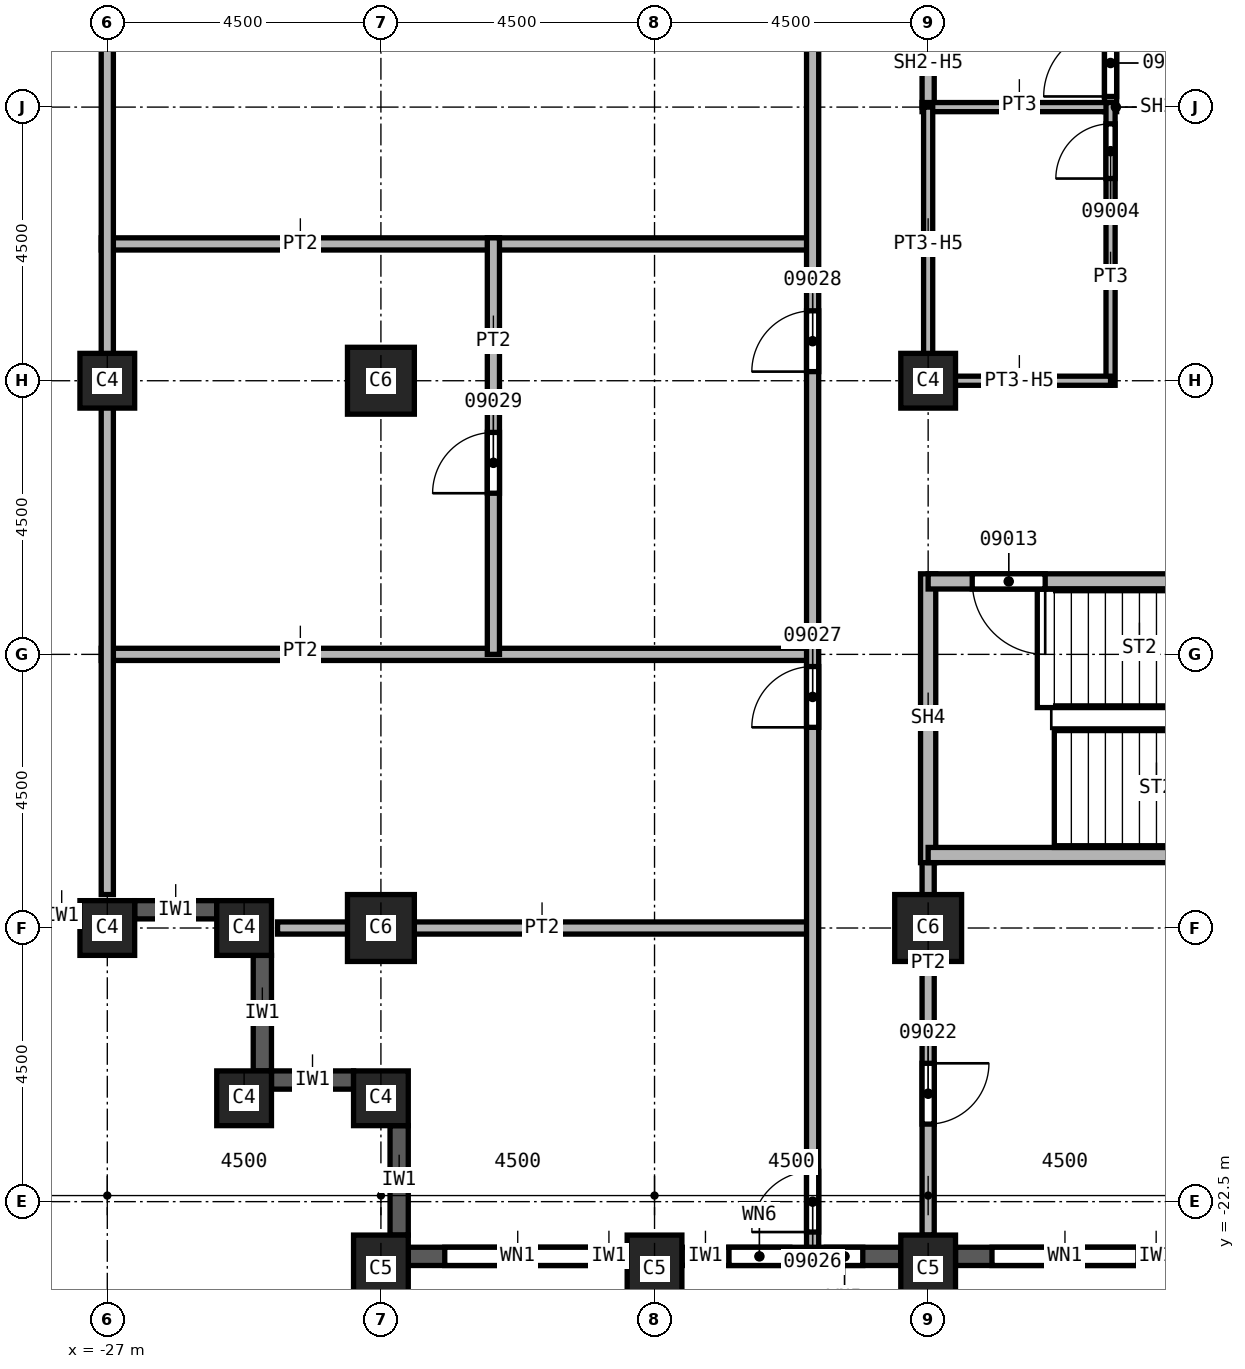
"""IFC4 building model, lengths in metres.
Left out: names, types, materials, properties, quantities, classifications, styles, units other than length and angle.
Written with IfcOpenShell. Run it as: python <this file> out.ifc"""

import sys

from ifc_helpers import new_model, si_unit, direction, frame, frame_2d, origin, origin_2d, place, context, subcontext, project, spatial, rectangle, extrude, element, fill, save


model = new_model("IFC4")
c1 = context("Model", 3, precision=1e-05, world=origin(), true_north=direction((0.0, 1.0)))
c2 = subcontext(c1, "Body", "Model", "MODEL_VIEW")
j1 = project(units=[si_unit("LENGTHUNIT", "METRE"), si_unit("PLANEANGLEUNIT", "RADIAN")], contexts=[c1])
p1 = place(None, origin())
s1 = spatial("IfcSite", under=j1, at=p1, CompositionType="ELEMENT")
p2 = place(p1, origin())
s2 = spatial("IfcBuilding", under=s1, at=p2, CompositionType="ELEMENT")
p3 = place(p2, frame((0.0, 0.0, 166.0)))
s3 = spatial("IfcBuildingStorey", under=s2, at=p3, CompositionType="ELEMENT", Elevation=166.0)
for number, where, z_axis, x_axis in (
    (1, (-13.5, -18.0, 0.0), (0.0, 0.0, 1.0), (1.0, 0.0, 0.0)),
    (2, (-22.5, -9.0, 0.0), (0.0, 0.0, 1.0), (1.0, 0.0, 0.0)),
    (3, (-22.5, -18.0, 0.0), (0.0, 0.0, 1.0), (1.0, 0.0, 0.0)),
):
    element("IfcColumn", number, at=place(p3, frame(where, z_axis=z_axis, x_axis=x_axis)), inside=s3, PredefinedType="COLUMN", context=c2, shape_type="SweptSolid", body=[
        extrude(rectangle(XDim=1.1, YDim=1.1, at=origin_2d()), origin(), (0.0, 0.0, 1.0), 3.7),
    ])
p4 = place(p3, frame((-13.5, -9.0, 0.0), z_axis=(0.0, 0.0, 1.0), x_axis=(1.0, 0.0, 0.0)))
e4 = element("IfcColumn", 4, at=p4, inside=s3, PredefinedType="COLUMN", context=c2, shape_type="SweptSolid", body=[
    extrude(rectangle(XDim=0.9, YDim=0.9, at=origin_2d()), origin(), (0.0, 0.0, 1.0), 3.7),
])
for number, where, z_axis, x_axis in (
    (5, (-13.5, -23.6, 0.0), (0.0, 0.0, 1.0), (1.0, 0.0, 0.0)),
    (6, (-18.0, -23.6, 0.0), (0.0, 0.0, 1.0), (1.0, 0.0, 0.0)),
    (7, (-22.5, -23.6, 0.0), (0.0, 0.0, 1.0), (1.0, 0.0, 0.0)),
):
    element("IfcColumn", number, at=place(p3, frame(where, z_axis=z_axis, x_axis=x_axis)), inside=s3, PredefinedType="COLUMN", context=c2, shape_type="SweptSolid", body=[
        extrude(rectangle(XDim=0.9, YDim=1.1, at=origin_2d()), origin(), (0.0, 0.0, 1.0), 3.7),
    ])
for number, where, z_axis, x_axis in (
    (8, (-27.0, -9.0, 0.0), (0.0, 0.0, 1.0), (1.0, 0.0, 0.0)),
    (9, (-27.0, -18.0, 0.0), (0.0, 0.0, 1.0), (1.0, 0.0, 0.0)),
    (10, (-22.5, -20.8, 0.0), (0.0, 0.0, 1.0), (1.0, 0.0, 0.0)),
    (11, (-24.75, -20.8, 0.0), (0.0, 0.0, 1.0), (1.0, 0.0, 0.0)),
    (12, (-24.75, -18.0, 0.0), (0.0, 0.0, 1.0), (1.0, 0.0, 0.0)),
):
    element("IfcColumn", number, at=place(p3, frame(where, z_axis=z_axis, x_axis=x_axis)), inside=s3, PredefinedType="COLUMN", context=c2, shape_type="SweptSolid", body=[
        extrude(rectangle(XDim=0.9, YDim=0.9, at=origin_2d()), origin(), (0.0, 0.0, 1.0), 3.7),
    ])
p5 = place(p3, frame((-31.05, -17.8, 0.0), z_axis=(0.0, 0.0, 1.0), x_axis=(1.0, 0.0, 0.0)))
e13 = element("IfcWall", 13, at=p5, inside=s3, PredefinedType="SOLIDWALL", context=c2, shape_type="SweptSolid", body=[
    extrude(rectangle(XDim=3.6, YDim=0.3, at=frame_2d((1.8, 0.0))), origin(), (0.0, 0.0, 1.0), 3.1),
])
p6 = place(p5, frame((0.6, 0.0, 0.8)))
e14 = element("IfcOpeningElement", 14, at=p6, cuts=e13, PredefinedType="OPENING", context=c2, shape_type="SweptSolid", body=[
    extrude(rectangle(XDim=2.4, YDim=1.95, at=frame_2d((1.2, 0.975))), frame((0.0, 0.15, 0.0), z_axis=(0.0, -1.0, 0.0), x_axis=(1.0, 0.0, 0.0)), (0.0, 0.0, 1.0), 0.3),
])
p7 = place(p3, frame((-26.55, -17.7, 0.0), z_axis=(0.0, 0.0, 1.0), x_axis=(1.0, 0.0, 0.0)))
e15 = element("IfcWall", 15, at=p7, inside=s3, PredefinedType="SOLIDWALL", context=c2, shape_type="SweptSolid", body=[
    extrude(rectangle(XDim=1.35, YDim=0.3, at=frame_2d((0.675, 0.0))), origin(), (0.0, 0.0, 1.0), 3.1),
])
p8 = place(p3, frame((-24.45, -18.45, 0.0), z_axis=(0.0, 0.0, 1.0), x_axis=(0.0, -1.0, 0.0)))
e16 = element("IfcWall", 16, at=p8, inside=s3, PredefinedType="SOLIDWALL", context=c2, shape_type="SweptSolid", body=[
    extrude(rectangle(XDim=1.9, YDim=0.3, at=frame_2d((0.95, 0.0))), origin(), (0.0, 0.0, 1.0), 3.1),
])
p9 = place(p3, frame((-24.3, -20.5, 0.0), z_axis=(0.0, 0.0, 1.0), x_axis=(1.0, 0.0, 0.0)))
e17 = element("IfcWall", 17, at=p9, inside=s3, PredefinedType="SOLIDWALL", context=c2, shape_type="SweptSolid", body=[
    extrude(rectangle(XDim=1.35, YDim=0.3, at=frame_2d((0.675, 0.0))), origin(), (0.0, 0.0, 1.0), 3.1),
])
p10 = place(p3, frame((-22.2, -21.25, 0.0), z_axis=(0.0, 0.0, 1.0), x_axis=(0.0, -1.0, 0.0)))
e18 = element("IfcWall", 18, at=p10, inside=s3, PredefinedType="SOLIDWALL", context=c2, shape_type="SweptSolid", body=[
    extrude(rectangle(XDim=1.8, YDim=0.3, at=frame_2d((0.9, 0.0))), origin(), (0.0, 0.0, 1.0), 3.1),
])
p11 = place(p3, frame((-22.05, -23.4, 0.0), z_axis=(0.0, 0.0, 1.0), x_axis=(1.0, 0.0, 0.0)))
e19 = element("IfcWall", 19, at=p11, inside=s3, PredefinedType="SOLIDWALL", context=c2, shape_type="SweptSolid", body=[
    extrude(rectangle(XDim=3.6, YDim=0.3, at=frame_2d((1.8, 0.0))), origin(), (0.0, 0.0, 1.0), 3.1),
])
p12 = place(p11, frame((0.6, 0.0, 0.8)))
e20 = element("IfcOpeningElement", 20, at=p12, cuts=e19, PredefinedType="OPENING", context=c2, shape_type="SweptSolid", body=[
    extrude(rectangle(XDim=2.4, YDim=1.95, at=frame_2d((1.2, 0.975))), frame((0.0, 0.15, 0.0), z_axis=(0.0, -1.0, 0.0), x_axis=(1.0, 0.0, 0.0)), (0.0, 0.0, 1.0), 0.3),
])
p13 = place(p3, frame((-17.55, -23.4, 0.0), z_axis=(0.0, 0.0, 1.0), x_axis=(1.0, 0.0, 0.0)))
e21 = element("IfcWall", 21, at=p13, inside=s3, PredefinedType="SOLIDWALL", context=c2, shape_type="SweptSolid", body=[
    extrude(rectangle(XDim=3.6, YDim=0.3, at=frame_2d((1.8, 0.0))), origin(), (0.0, 0.0, 1.0), 3.1),
])
p14 = place(p13, frame((0.775, 0.0, 0.8)))
e22 = element("IfcOpeningElement", 22, at=p14, cuts=e21, PredefinedType="OPENING", context=c2, shape_type="SweptSolid", body=[
    extrude(rectangle(XDim=1.0, YDim=1.95, at=frame_2d((0.5, 0.975))), frame((0.0, 0.15, 0.0), z_axis=(0.0, -1.0, 0.0), x_axis=(1.0, 0.0, 0.0)), (0.0, 0.0, 1.0), 0.3),
])
p15 = place(p13, frame((2.375, 0.0, 0.8)))
e23 = element("IfcOpeningElement", 23, at=p15, cuts=e21, PredefinedType="OPENING", context=c2, shape_type="SweptSolid", body=[
    extrude(rectangle(XDim=0.6, YDim=1.95, at=frame_2d((0.3, 0.975))), frame((0.0, 0.15, 0.0), z_axis=(0.0, -1.0, 0.0), x_axis=(1.0, 0.0, 0.0)), (0.0, 0.0, 1.0), 0.3),
])
p16 = place(p3, frame((-13.05, -23.4, 0.0), z_axis=(0.0, 0.0, 1.0), x_axis=(1.0, 0.0, 0.0)))
e24 = element("IfcWall", 24, at=p16, inside=s3, PredefinedType="SOLIDWALL", context=c2, shape_type="SweptSolid", body=[
    extrude(rectangle(XDim=3.6, YDim=0.3, at=frame_2d((1.8, 0.0))), origin(), (0.0, 0.0, 1.0), 3.1),
])
p17 = place(p16, frame((0.6, 0.0, 0.8)))
e25 = element("IfcOpeningElement", 25, at=p17, cuts=e24, PredefinedType="OPENING", context=c2, shape_type="SweptSolid", body=[
    extrude(rectangle(XDim=2.4, YDim=1.95, at=frame_2d((1.2, 0.975))), frame((0.0, 0.15, 0.0), z_axis=(0.0, -1.0, 0.0), x_axis=(1.0, 0.0, 0.0)), (0.0, 0.0, 1.0), 0.3),
])
for number, where, z_axis, x_axis in (
    (26, (-27.1, -13.5, 0.0), (0.0, 0.0, 1.0), (1.0, 0.0, 0.0)),
    (27, (-27.1, -6.75, 0.0), (0.0, 0.0, 1.0), (1.0, 0.0, 0.0)),
):
    element("IfcWall", number, at=place(p3, frame(where, z_axis=z_axis, x_axis=x_axis)), inside=s3, PredefinedType="PARTITIONING", context=c2, shape_type="SweptSolid", body=[
        extrude(rectangle(XDim=11.7, YDim=0.2, at=frame_2d((5.85, 0.0))), origin(), (0.0, 0.0, 1.0), 3.7),
    ])
p18 = place(p3, frame((-27.0, -17.45, 0.0), z_axis=(0.0, 0.0, 1.0), x_axis=(0.0, 1.0, 0.0)))
e28 = element("IfcWall", 28, at=p18, inside=s3, PredefinedType="PARTITIONING", context=c2, shape_type="SweptSolid", body=[
    extrude(rectangle(XDim=18.2, YDim=0.2, at=frame_2d((9.1, 0.0))), origin(), (0.0, 0.0, 1.0), 3.7),
])
p19 = place(p3, frame((-24.2, -18.0, 0.0), z_axis=(0.0, 0.0, 1.0), x_axis=(1.0, 0.0, 0.0)))
e29 = element("IfcWall", 29, at=p19, inside=s3, PredefinedType="PARTITIONING", context=c2, shape_type="SweptSolid", body=[
    extrude(rectangle(XDim=8.8, YDim=0.2, at=frame_2d((4.4, 0.0))), origin(), (0.0, 0.0, 1.0), 3.7),
])
p20 = place(p3, frame((-20.65, -13.5, 0.0), z_axis=(0.0, 0.0, 1.0), x_axis=(0.0, 1.0, 0.0)))
e30 = element("IfcWall", 30, at=p20, inside=s3, PredefinedType="PARTITIONING", context=c2, shape_type="SweptSolid", body=[
    extrude(rectangle(XDim=6.85, YDim=0.2, at=frame_2d((3.425, 0.0))), origin(), (0.0, 0.0, 1.0), 3.7),
])
p21 = place(p20, frame((2.65, 0.0, 0.0)))
e31 = element("IfcOpeningElement", 31, at=p21, cuts=e30, PredefinedType="OPENING", context=c2, shape_type="SweptSolid", body=[
    extrude(rectangle(XDim=1.0, YDim=2.1, at=frame_2d((0.5, 1.05))), frame((0.0, 0.1, 0.0), z_axis=(0.0, -1.0, 0.0), x_axis=(1.0, 0.0, 0.0)), (0.0, 0.0, 1.0), 0.2),
])
p22 = place(p3, frame((-15.4, -23.25, 0.0), z_axis=(0.0, 0.0, 1.0), x_axis=(0.0, 1.0, 0.0)))
e32 = element("IfcWall", 32, at=p22, inside=s3, PredefinedType="PARTITIONING", context=c2, shape_type="SweptSolid", body=[
    extrude(rectangle(XDim=24.1, YDim=0.2, at=frame_2d((12.05, 0.0))), origin(), (0.0, 0.0, 1.0), 3.7),
])
p23 = place(p22, frame((0.25, 0.0, 0.0)))
e33 = element("IfcOpeningElement", 33, at=p23, cuts=e32, PredefinedType="OPENING", context=c2, shape_type="SweptSolid", body=[
    extrude(rectangle(XDim=1.0, YDim=2.1, at=frame_2d((0.5, 1.05))), frame((0.0, 0.1, 0.0), z_axis=(0.0, -1.0, 0.0), x_axis=(1.0, 0.0, 0.0)), (0.0, 0.0, 1.0), 0.2),
])
p24 = place(p22, frame((8.55, 0.0, 0.0)))
e34 = element("IfcOpeningElement", 34, at=p24, cuts=e32, PredefinedType="OPENING", context=c2, shape_type="SweptSolid", body=[
    extrude(rectangle(XDim=1.0, YDim=2.1, at=frame_2d((0.5, 1.05))), frame((0.0, 0.1, 0.0), z_axis=(0.0, -1.0, 0.0), x_axis=(1.0, 0.0, 0.0)), (0.0, 0.0, 1.0), 0.2),
])
p25 = place(p22, frame((14.4, 0.0, 0.0)))
e35 = element("IfcOpeningElement", 35, at=p25, cuts=e32, PredefinedType="OPENING", context=c2, shape_type="SweptSolid", body=[
    extrude(rectangle(XDim=1.0, YDim=2.1, at=frame_2d((0.5, 1.05))), frame((0.0, 0.1, 0.0), z_axis=(0.0, -1.0, 0.0), x_axis=(1.0, 0.0, 0.0)), (0.0, 0.0, 1.0), 0.2),
])
p26 = place(p3, frame((-13.5, -16.675, 0.0), z_axis=(0.0, 0.0, 1.0), x_axis=(0.0, -1.0, 0.0)))
e36 = element("IfcWall", 36, at=p26, inside=s3, PredefinedType="PARTITIONING", context=c2, shape_type="SweptSolid", body=[
    extrude(rectangle(XDim=6.375, YDim=0.2, at=frame_2d((3.188, 0.0))), origin(), (0.0, 0.0, 1.0), 3.7),
])
p27 = place(p26, frame((3.55, 0.0, 0.0)))
e37 = element("IfcOpeningElement", 37, at=p27, cuts=e36, PredefinedType="OPENING", context=c2, shape_type="SweptSolid", body=[
    extrude(rectangle(XDim=1.0, YDim=2.1, at=frame_2d((0.5, 1.05))), frame((0.0, 0.1, 0.0), z_axis=(0.0, -1.0, 0.0), x_axis=(1.0, 0.0, 0.0)), (0.0, 0.0, 1.0), 0.2),
])
p28 = place(p3, frame((-13.5, -4.5, 0.0), z_axis=(0.0, 0.0, 1.0), x_axis=(0.0, 1.0, 0.0)))
e38 = element("IfcWall", 38, at=p28, inside=s3, PredefinedType="SOLIDWALL", context=c2, shape_type="SweptSolid", body=[
    extrude(rectangle(XDim=1.5, YDim=0.2, at=frame_2d((0.75, 0.0))), origin(), (0.0, 0.0, 1.0), 2.938),
])
p29 = place(p3, frame((-10.5, -4.575, 0.0), z_axis=(0.0, 0.0, 1.0), x_axis=(0.0, 1.0, 0.0)))
e39 = element("IfcWall", 39, at=p29, inside=s3, PredefinedType="SOLIDWALL", context=c2, shape_type="SweptSolid", body=[
    extrude(rectangle(XDim=1.7, YDim=0.2, at=frame_2d((0.85, 0.0))), origin(), (0.0, 0.0, 1.0), 3.7),
])
p30 = place(p29, frame((0.25, 0.0, 0.0)))
e40 = element("IfcOpeningElement", 40, at=p30, cuts=e39, PredefinedType="OPENING", context=c2, shape_type="SweptSolid", body=[
    extrude(rectangle(XDim=1.1, YDim=2.1, at=frame_2d((0.55, 1.05))), frame((0.0, 0.1, 0.0), z_axis=(0.0, -1.0, 0.0), x_axis=(1.0, 0.0, 0.0)), (0.0, 0.0, 1.0), 0.2),
])
p31 = place(p3, frame((-13.5, -12.175, 0.0), z_axis=(0.0, 0.0, 1.0), x_axis=(0.0, -1.0, 0.0)))
e41 = element("IfcWall", 41, at=p31, inside=s3, PredefinedType="SOLIDWALL", context=c2, shape_type="SweptSolid", body=[
    extrude(rectangle(XDim=4.75, YDim=0.25, at=frame_2d((2.375, 0.0))), origin(), (0.0, 0.0, 1.0), 3.7),
])
p32 = place(p3, frame((-4.5, -16.8, 0.0), z_axis=(0.0, 0.0, 1.0), x_axis=(-1.0, 0.0, 0.0)))
e42 = element("IfcWall", 42, at=p32, inside=s3, PredefinedType="SOLIDWALL", context=c2, shape_type="SweptSolid", body=[
    extrude(rectangle(XDim=9.0, YDim=0.25, at=frame_2d((4.5, 0.0))), origin(), (0.0, 0.0, 1.0), 3.7),
])
p33 = place(p3, frame((-4.375, -12.3, 0.0), z_axis=(0.0, 0.0, 1.0), x_axis=(-1.0, 0.0, 0.0)))
e43 = element("IfcWall", 43, at=p33, inside=s3, PredefinedType="SOLIDWALL", context=c2, shape_type="SweptSolid", body=[
    extrude(rectangle(XDim=9.125, YDim=0.25, at=frame_2d((4.562, 0.0))), origin(), (0.0, 0.0, 1.0), 3.7),
])
p34 = place(p33, frame((7.2, 0.0, 0.0)))
e44 = element("IfcOpeningElement", 44, at=p34, cuts=e43, PredefinedType="OPENING", context=c2, shape_type="SweptSolid", body=[
    extrude(rectangle(XDim=1.2, YDim=2.1, at=frame_2d((0.6, 1.05))), frame((0.0, 0.125, 0.0), z_axis=(0.0, -1.0, 0.0), x_axis=(1.0, 0.0, 0.0)), (0.0, 0.0, 1.0), 0.25),
])
p35 = place(p3, frame((-13.6, -4.5, 0.0), z_axis=(0.0, 0.0, 1.0), x_axis=(1.0, 0.0, 0.0)))
e45 = element("IfcWall", 45, at=p35, inside=s3, PredefinedType="PARTITIONING", context=c2, shape_type="SweptSolid", body=[
    extrude(rectangle(XDim=3.1, YDim=0.15, at=frame_2d((1.55, 0.0))), origin(), (0.0, 0.0, 1.0), 3.7),
])
p36 = place(p3, frame((-13.5, -9.075, 0.0), z_axis=(0.0, 0.0, 1.0), x_axis=(0.0, 1.0, 0.0)))
e46 = element("IfcWall", 46, at=p36, inside=s3, PredefinedType="PARTITIONING", context=c2, shape_type="SweptSolid", body=[
    extrude(rectangle(XDim=4.575, YDim=0.15, at=frame_2d((2.288, 0.0))), origin(), (0.0, 0.0, 1.0), 2.938),
])
p37 = place(p3, frame((-10.5, -9.075, 0.0), z_axis=(0.0, 0.0, 1.0), x_axis=(0.0, 1.0, 0.0)))
e47 = element("IfcWall", 47, at=p37, inside=s3, PredefinedType="PARTITIONING", context=c2, shape_type="SweptSolid", body=[
    extrude(rectangle(XDim=4.65, YDim=0.15, at=frame_2d((2.325, 0.0))), origin(), (0.0, 0.0, 1.0), 3.7),
])
p38 = place(p37, frame((3.4, 0.0, 0.0)))
e48 = element("IfcOpeningElement", 48, at=p38, cuts=e47, PredefinedType="OPENING", context=c2, shape_type="SweptSolid", body=[
    extrude(rectangle(XDim=0.9, YDim=2.1, at=frame_2d((0.45, 1.05))), frame((0.0, 0.075, 0.0), z_axis=(0.0, -1.0, 0.0), x_axis=(1.0, 0.0, 0.0)), (0.0, 0.0, 1.0), 0.15),
])
p39 = place(p3, frame((-10.5, -9.0, 0.0), z_axis=(0.0, 0.0, 1.0), x_axis=(-1.0, 0.0, 0.0)))
e49 = element("IfcWall", 49, at=p39, inside=s3, PredefinedType="PARTITIONING", context=c2, shape_type="SweptSolid", body=[
    extrude(rectangle(XDim=3.0, YDim=0.15, at=frame_2d((1.5, 0.0))), origin(), (0.0, 0.0, 1.0), 2.938),
])
p40 = place(p12, origin())
e50 = element("IfcWindow", 50, at=p40, inside=s3, PartitioningType="SINGLE_PANEL", PredefinedType="WINDOW", context=c2, shape_type="SweptSolid", body=[
    extrude(rectangle(XDim=2.4, YDim=1.95, at=frame_2d((1.2, 0.975))), frame((0.0, 0.03, 0.0), z_axis=(0.0, -1.0, 0.0), x_axis=(1.0, 0.0, 0.0)), (0.0, 0.0, 1.0), 0.06),
])
fill(e20, e50)
p41 = place(p17, origin())
e51 = element("IfcWindow", 51, at=p41, inside=s3, PartitioningType="SINGLE_PANEL", PredefinedType="WINDOW", context=c2, shape_type="SweptSolid", body=[
    extrude(rectangle(XDim=2.4, YDim=1.95, at=frame_2d((1.2, 0.975))), frame((0.0, 0.03, 0.0), z_axis=(0.0, -1.0, 0.0), x_axis=(1.0, 0.0, 0.0)), (0.0, 0.0, 1.0), 0.06),
])
fill(e25, e51)
p42 = place(p38, origin())
e52 = element("IfcDoor", 52, at=p42, inside=s3, OperationType="SINGLE_SWING_LEFT", PredefinedType="DOOR", context=c2, shape_type="SweptSolid", body=[
    extrude(rectangle(XDim=0.9, YDim=2.1, at=frame_2d((0.45, 1.05))), frame((0.0, 0.025, 0.0), z_axis=(0.0, -1.0, 0.0), x_axis=(1.0, 0.0, 0.0)), (0.0, 0.0, 1.0), 0.05),
])
fill(e48, e52)
p43 = place(p30, origin())
e53 = element("IfcDoor", 53, at=p43, inside=s3, OperationType="SINGLE_SWING_RIGHT", PredefinedType="DOOR", context=c2, shape_type="SweptSolid", body=[
    extrude(rectangle(XDim=1.1, YDim=2.1, at=frame_2d((0.55, 1.05))), frame((0.0, 0.025, 0.0), z_axis=(0.0, -1.0, 0.0), x_axis=(1.0, 0.0, 0.0)), (0.0, 0.0, 1.0), 0.05),
])
fill(e40, e53)
p44 = place(p34, origin())
e54 = element("IfcDoor", 54, at=p44, inside=s3, OperationType="SINGLE_SWING_RIGHT", PredefinedType="DOOR", context=c2, shape_type="SweptSolid", body=[
    extrude(rectangle(XDim=1.2, YDim=2.1, at=frame_2d((0.6, 1.05))), frame((0.0, 0.025, 0.0), z_axis=(0.0, -1.0, 0.0), x_axis=(1.0, 0.0, 0.0)), (0.0, 0.0, 1.0), 0.05),
])
fill(e44, e54)
p45 = place(p27, origin())
e55 = element("IfcDoor", 55, at=p45, inside=s3, OperationType="SINGLE_SWING_LEFT", PredefinedType="DOOR", context=c2, shape_type="SweptSolid", body=[
    extrude(rectangle(XDim=1.0, YDim=2.1, at=frame_2d((0.5, 1.05))), frame((0.0, 0.025, 0.0), z_axis=(0.0, -1.0, 0.0), x_axis=(1.0, 0.0, 0.0)), (0.0, 0.0, 1.0), 0.05),
])
fill(e37, e55)
p46 = place(p23, origin())
e56 = element("IfcDoor", 56, at=p46, inside=s3, OperationType="SINGLE_SWING_LEFT", PredefinedType="DOOR", context=c2, shape_type="SweptSolid", body=[
    extrude(rectangle(XDim=1.0, YDim=2.1, at=frame_2d((0.5, 1.05))), frame((0.0, 0.025, 0.0), z_axis=(0.0, -1.0, 0.0), x_axis=(1.0, 0.0, 0.0)), (0.0, 0.0, 1.0), 0.05),
])
fill(e33, e56)
p47 = place(p24, origin())
e57 = element("IfcDoor", 57, at=p47, inside=s3, OperationType="SINGLE_SWING_RIGHT", PredefinedType="DOOR", context=c2, shape_type="SweptSolid", body=[
    extrude(rectangle(XDim=1.0, YDim=2.1, at=frame_2d((0.5, 1.05))), frame((0.0, 0.025, 0.0), z_axis=(0.0, -1.0, 0.0), x_axis=(1.0, 0.0, 0.0)), (0.0, 0.0, 1.0), 0.05),
])
fill(e34, e57)
p48 = place(p25, origin())
e58 = element("IfcDoor", 58, at=p48, inside=s3, OperationType="SINGLE_SWING_LEFT", PredefinedType="DOOR", context=c2, shape_type="SweptSolid", body=[
    extrude(rectangle(XDim=1.0, YDim=2.1, at=frame_2d((0.5, 1.05))), frame((0.0, 0.025, 0.0), z_axis=(0.0, -1.0, 0.0), x_axis=(1.0, 0.0, 0.0)), (0.0, 0.0, 1.0), 0.05),
])
fill(e35, e58)
p49 = place(p21, origin())
e59 = element("IfcDoor", 59, at=p49, inside=s3, OperationType="SINGLE_SWING_RIGHT", PredefinedType="DOOR", context=c2, shape_type="SweptSolid", body=[
    extrude(rectangle(XDim=1.0, YDim=2.1, at=frame_2d((0.5, 1.05))), frame((0.0, 0.025, 0.0), z_axis=(0.0, -1.0, 0.0), x_axis=(1.0, 0.0, 0.0)), (0.0, 0.0, 1.0), 0.05),
])
fill(e31, e59)
p50 = place(p14, origin())
e60 = element("IfcWindow", 60, at=p50, inside=s3, PartitioningType="SINGLE_PANEL", PredefinedType="WINDOW", context=c2, shape_type="SweptSolid", body=[
    extrude(rectangle(XDim=1.0, YDim=1.95, at=frame_2d((0.5, 0.975))), frame((0.0, 0.03, 0.0), z_axis=(0.0, -1.0, 0.0), x_axis=(1.0, 0.0, 0.0)), (0.0, 0.0, 1.0), 0.06),
])
fill(e22, e60)
p51 = place(p15, origin())
e61 = element("IfcWindow", 61, at=p51, inside=s3, PartitioningType="SINGLE_PANEL", PredefinedType="WINDOW", context=c2, shape_type="SweptSolid", body=[
    extrude(rectangle(XDim=0.6, YDim=1.95, at=frame_2d((0.3, 0.975))), frame((0.0, 0.03, 0.0), z_axis=(0.0, -1.0, 0.0), x_axis=(1.0, 0.0, 0.0)), (0.0, 0.0, 1.0), 0.06),
])
fill(e23, e61)
save(model, sys.argv[1])
